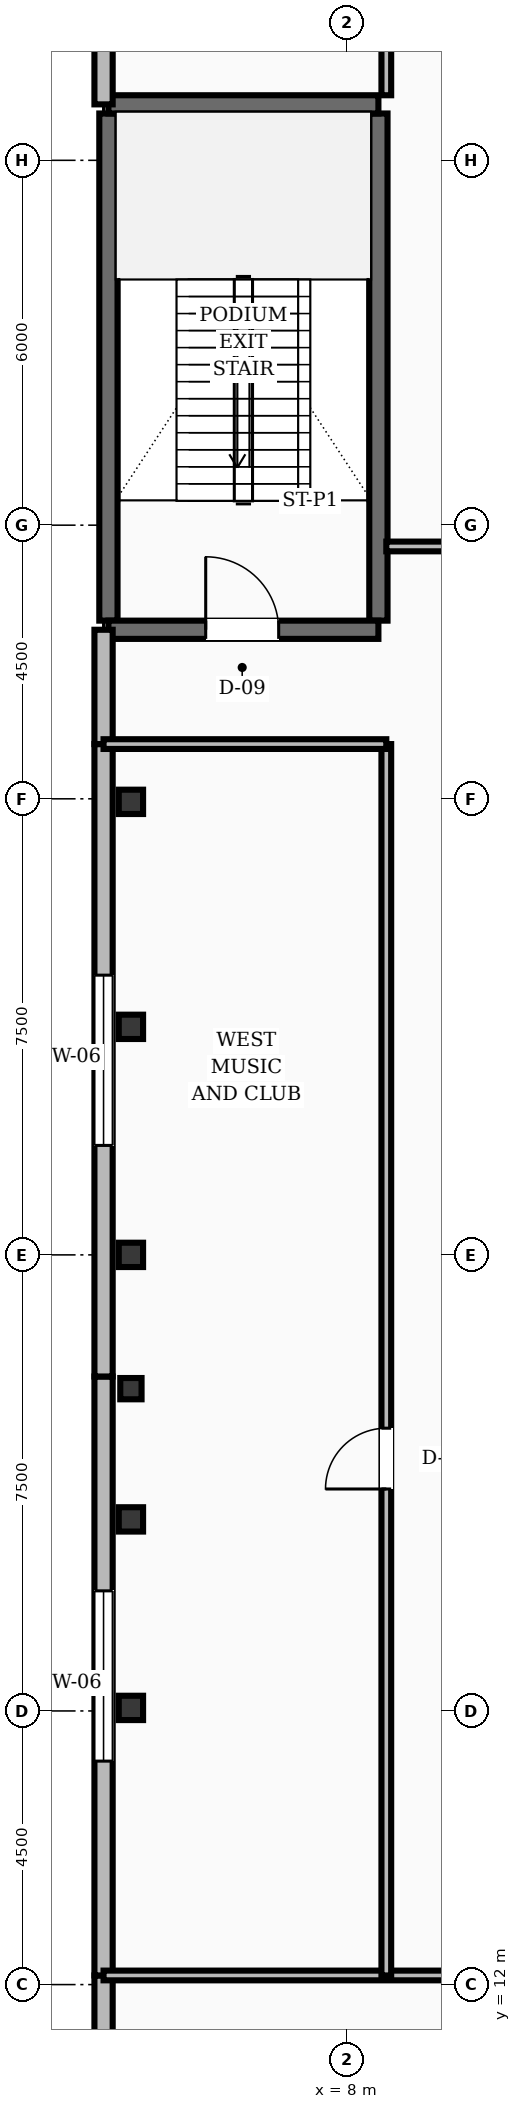
"""IFC4 building model, lengths in metres.
Left out: names, types, materials, properties, quantities, classifications, styles, units other than length and angle.
Written with IfcOpenShell. Run it as: python <this file> out.ifc"""

import sys

from ifc_helpers import new_model, si_unit, direction, frame, frame_2d, origin, origin_2d, place, context, subcontext, project, spatial, rectangle, hollow_rectangle, i_section, extrude, element, fill, save


model = new_model("IFC4")
c1 = context("Model", 3, precision=1e-05, world=origin(), true_north=direction((0.0, 1.0)))
c2 = subcontext(c1, "Body", "Model", "MODEL_VIEW")
j1 = project(units=[si_unit("LENGTHUNIT", "METRE"), si_unit("PLANEANGLEUNIT", "RADIAN")], contexts=[c1])
p1 = place(None, origin())
s1 = spatial("IfcSite", under=j1, at=p1, CompositionType="ELEMENT")
p2 = place(p1, origin())
s2 = spatial("IfcBuilding", under=s1, at=p2, CompositionType="ELEMENT")
p3 = place(p2, frame((0.0, 0.0, 5.2)))
s3 = spatial("IfcBuildingStorey", under=s2, at=p3, CompositionType="ELEMENT", Elevation=5.2)
for number, where, z_axis, x_axis in (
    (1, (4.08, 34.43, 0.0), (0.0, 0.0, 1.0), (0.0, 1.0, 0.0)),
    (2, (8.52, 34.43, 0.0), (0.0, 0.0, 1.0), (0.0, 1.0, 0.0)),
):
    element("IfcWall", number, at=place(p3, frame(where, z_axis=z_axis, x_axis=x_axis)), inside=s3, PredefinedType="SHEAR", context=c2, shape_type="SweptSolid", body=[
        extrude(rectangle(XDim=8.34, YDim=0.3, at=frame_2d((4.17, 0.0))), origin(), (0.0, 0.0, 1.0), 4.8),
    ])
p4 = place(p3, frame((4.08, 34.28, 0.0), z_axis=(0.0, 0.0, 1.0), x_axis=(1.0, 0.0, 0.0)))
e3 = element("IfcWall", 3, at=p4, inside=s3, PredefinedType="SHEAR", context=c2, shape_type="SweptSolid", body=[
    extrude(rectangle(XDim=4.44, YDim=0.3, at=frame_2d((2.22, 0.0))), origin(), (0.0, 0.0, 1.0), 4.8),
])
p5 = place(p4, frame((1.6, 0.0, 0.0)))
e4 = element("IfcOpeningElement", 4, at=p5, cuts=e3, PredefinedType="OPENING", context=c2, shape_type="SweptSolid", body=[
    extrude(rectangle(XDim=1.2, YDim=2.1, at=frame_2d((0.6, 1.05))), frame((0.0, 0.16, 0.0), z_axis=(0.0, -1.0, 0.0), x_axis=(1.0, 0.0, 0.0)), (0.0, 0.0, 1.0), 0.32),
])
p6 = place(p3, frame((4.08, 42.92, 0.0), z_axis=(0.0, 0.0, 1.0), x_axis=(1.0, 0.0, 0.0)))
e5 = element("IfcWall", 5, at=p6, inside=s3, PredefinedType="SHEAR", context=c2, shape_type="SweptSolid", body=[
    extrude(rectangle(XDim=4.44, YDim=0.3, at=frame_2d((2.22, 0.0))), origin(), (0.0, 0.0, 1.0), 4.8),
])
for number, where, z_axis, x_axis in (
    (6, (4.45, 16.55, 0.0), (0.0, 0.0, 1.0), (1.0, 0.0, 0.0)),
    (7, (4.45, 19.65, 0.0), (0.0, 0.0, 1.0), (1.0, 0.0, 0.0)),
    (8, (4.45, 24.0, 0.0), (0.0, 0.0, 1.0), (1.0, 0.0, 0.0)),
    (9, (4.45, 27.75, 0.0), (0.0, 0.0, 1.0), (1.0, 0.0, 0.0)),
    (10, (4.45, 31.45, 0.0), (0.0, 0.0, 1.0), (1.0, 0.0, 0.0)),
):
    element("IfcColumn", number, at=place(p3, frame(where, z_axis=z_axis, x_axis=x_axis)), inside=s3, PredefinedType="COLUMN", context=c2, shape_type="SweptSolid", body=[
        extrude(i_section(OverallWidth=0.4, OverallDepth=0.4, WebThickness=0.013, FlangeThickness=0.021, FilletRadius=0.018, at=origin_2d()), origin(), (0.0, 0.0, 1.0), 4.8),
    ])
p7 = place(p3, frame((4.45, 21.8, 0.0), z_axis=(0.0, 0.0, 1.0), x_axis=(1.0, 0.0, 0.0)))
e11 = element("IfcColumn", 11, at=p7, inside=s3, PredefinedType="PILASTER", context=c2, shape_type="SweptSolid", body=[
    extrude(hollow_rectangle(XDim=0.35, YDim=0.35, WallThickness=0.016, at=origin_2d()), origin(), (0.0, 0.0, 1.0), 4.8),
])
p8 = place(p3, frame((4.0, 12.15, 0.0), z_axis=(0.0, 0.0, 1.0), x_axis=(0.0, -1.0, 0.0)))
e12 = element("IfcWall", 12, at=p8, inside=s3, PredefinedType="STANDARD", context=c2, shape_type="SweptSolid", body=[
    extrude(rectangle(XDim=9.15, YDim=0.3, at=frame_2d((4.575, 0.0))), origin(), (0.0, 0.0, 1.0), 3.57),
])
p9 = place(p8, frame((3.175, 0.0, 0.85)))
e13 = element("IfcOpeningElement", 13, at=p9, cuts=e12, PredefinedType="OPENING", context=c2, shape_type="SweptSolid", body=[
    extrude(rectangle(XDim=2.8, YDim=2.3, at=frame_2d((1.4, 1.15))), frame((0.0, 0.16, 0.0), z_axis=(0.0, -1.0, 0.0), x_axis=(1.0, 0.0, 0.0)), (0.0, 0.0, 1.0), 0.32),
])
p10 = place(p3, frame((4.0, 22.0, 0.0), z_axis=(0.0, 0.0, 1.0), x_axis=(0.0, -1.0, 0.0)))
e14 = element("IfcWall", 14, at=p10, inside=s3, PredefinedType="STANDARD", context=c2, shape_type="SweptSolid", body=[
    extrude(rectangle(XDim=9.85, YDim=0.3, at=frame_2d((4.925, 0.0))), origin(), (0.0, 0.0, 1.0), 3.57),
])
p11 = place(p10, frame((3.525, 0.0, 0.85)))
e15 = element("IfcOpeningElement", 15, at=p11, cuts=e14, PredefinedType="OPENING", context=c2, shape_type="SweptSolid", body=[
    extrude(rectangle(XDim=2.8, YDim=2.3, at=frame_2d((1.4, 1.15))), frame((0.0, 0.16, 0.0), z_axis=(0.0, -1.0, 0.0), x_axis=(1.0, 0.0, 0.0)), (0.0, 0.0, 1.0), 0.32),
])
p12 = place(p3, frame((4.0, 32.4, 0.0), z_axis=(0.0, 0.0, 1.0), x_axis=(0.0, -1.0, 0.0)))
e16 = element("IfcWall", 16, at=p12, inside=s3, PredefinedType="STANDARD", context=c2, shape_type="SweptSolid", body=[
    extrude(rectangle(XDim=10.4, YDim=0.3, at=frame_2d((5.2, 0.0))), origin(), (0.0, 0.0, 1.0), 3.57),
])
p13 = place(p12, frame((3.8, 0.0, 0.85)))
e17 = element("IfcOpeningElement", 17, at=p13, cuts=e16, PredefinedType="OPENING", context=c2, shape_type="SweptSolid", body=[
    extrude(rectangle(XDim=2.8, YDim=2.3, at=frame_2d((1.4, 1.15))), frame((0.0, 0.16, 0.0), z_axis=(0.0, -1.0, 0.0), x_axis=(1.0, 0.0, 0.0)), (0.0, 0.0, 1.0), 0.32),
])
p14 = place(p3, frame((4.0, 34.28, 0.0), z_axis=(0.0, 0.0, 1.0), x_axis=(0.0, -1.0, 0.0)))
e18 = element("IfcWall", 18, at=p14, inside=s3, PredefinedType="STANDARD", context=c2, shape_type="SweptSolid", body=[
    extrude(rectangle(XDim=1.88, YDim=0.3, at=frame_2d((0.94, 0.0))), origin(), (0.0, 0.0, 1.0), 3.57),
])
p15 = place(p3, frame((4.0, 45.0, 0.0), z_axis=(0.0, 0.0, 1.0), x_axis=(0.0, -1.0, 0.0)))
e19 = element("IfcWall", 19, at=p15, inside=s3, PredefinedType="STANDARD", context=c2, shape_type="SweptSolid", body=[
    extrude(rectangle(XDim=2.08, YDim=0.3, at=frame_2d((1.04, 0.0))), origin(), (0.0, 0.0, 1.0), 3.57),
])
p16 = place(p3, frame((8.65, 35.65, 0.0), z_axis=(0.0, 0.0, 1.0), x_axis=(1.0, 0.0, 0.0)))
e20 = element("IfcWall", 20, at=p16, inside=s3, PredefinedType="SOLIDWALL", context=c2, shape_type="SweptSolid", body=[
    extrude(rectangle(XDim=46.7, YDim=0.16, at=frame_2d((23.35, 0.0))), origin(), (0.0, 0.0, 1.0), 3.52),
])
p17 = place(p16, frame((10.0, 0.0, 0.0)))
e21 = element("IfcOpeningElement", 21, at=p17, cuts=e20, PredefinedType="OPENING", context=c2, shape_type="SweptSolid", body=[
    extrude(rectangle(XDim=1.4, YDim=2.15, at=frame_2d((0.7, 1.075))), frame((0.0, 0.09, 0.0), z_axis=(0.0, -1.0, 0.0), x_axis=(1.0, 0.0, 0.0)), (0.0, 0.0, 1.0), 0.18),
])
p18 = place(p16, frame((28.0, 0.0, 0.0)))
e22 = element("IfcOpeningElement", 22, at=p18, cuts=e20, PredefinedType="OPENING", context=c2, shape_type="SweptSolid", body=[
    extrude(rectangle(XDim=1.2, YDim=2.1, at=frame_2d((0.6, 1.05))), frame((0.0, 0.09, 0.0), z_axis=(0.0, -1.0, 0.0), x_axis=(1.0, 0.0, 0.0)), (0.0, 0.0, 1.0), 0.18),
])
p19 = place(p16, frame((43.0, 0.0, 0.0)))
e23 = element("IfcOpeningElement", 23, at=p19, cuts=e20, PredefinedType="OPENING", context=c2, shape_type="SweptSolid", body=[
    extrude(rectangle(XDim=0.95, YDim=2.1, at=frame_2d((0.475, 1.05))), frame((0.0, 0.09, 0.0), z_axis=(0.0, -1.0, 0.0), x_axis=(1.0, 0.0, 0.0)), (0.0, 0.0, 1.0), 0.18),
])
p20 = place(p3, frame((4.0, 12.15, 0.0), z_axis=(0.0, 0.0, 1.0), x_axis=(1.0, 0.0, 0.0)))
e24 = element("IfcWall", 24, at=p20, inside=s3, PredefinedType="SOLIDWALL", context=c2, shape_type="SweptSolid", body=[
    extrude(rectangle(XDim=51.35, YDim=0.16, at=frame_2d((25.675, 0.0))), origin(), (0.0, 0.0, 1.0), 3.52),
])
p21 = place(p20, frame((14.0, 0.0, 0.0)))
e25 = element("IfcOpeningElement", 25, at=p21, cuts=e24, PredefinedType="OPENING", context=c2, shape_type="SweptSolid", body=[
    extrude(rectangle(XDim=1.4, YDim=2.15, at=frame_2d((0.7, 1.075))), frame((0.0, 0.09, 0.0), z_axis=(0.0, -1.0, 0.0), x_axis=(1.0, 0.0, 0.0)), (0.0, 0.0, 1.0), 0.18),
])
p22 = place(p20, frame((40.0, 0.0, 0.0)))
e26 = element("IfcOpeningElement", 26, at=p22, cuts=e24, PredefinedType="OPENING", context=c2, shape_type="SweptSolid", body=[
    extrude(rectangle(XDim=1.2, YDim=2.1, at=frame_2d((0.6, 1.05))), frame((0.0, 0.09, 0.0), z_axis=(0.0, -1.0, 0.0), x_axis=(1.0, 0.0, 0.0)), (0.0, 0.0, 1.0), 0.18),
])
p23 = place(p3, frame((8.65, 12.15, 0.0), z_axis=(0.0, 0.0, 1.0), x_axis=(0.0, 1.0, 0.0)))
e27 = element("IfcWall", 27, at=p23, inside=s3, PredefinedType="SOLIDWALL", context=c2, shape_type="SweptSolid", body=[
    extrude(rectangle(XDim=20.25, YDim=0.16, at=frame_2d((10.125, 0.0))), origin(), (0.0, 0.0, 1.0), 3.52),
])
p24 = place(p23, frame((8.0, 0.0, 0.0)))
e28 = element("IfcOpeningElement", 28, at=p24, cuts=e27, PredefinedType="OPENING", context=c2, shape_type="SweptSolid", body=[
    extrude(rectangle(XDim=1.0, YDim=2.1, at=frame_2d((0.5, 1.05))), frame((0.0, 0.09, 0.0), z_axis=(0.0, -1.0, 0.0), x_axis=(1.0, 0.0, 0.0)), (0.0, 0.0, 1.0), 0.18),
])
p25 = place(p3, frame((4.0, 32.4, 0.0), z_axis=(0.0, 0.0, 1.0), x_axis=(1.0, 0.0, 0.0)))
e29 = element("IfcWall", 29, at=p25, inside=s3, PredefinedType="SOLIDWALL", context=c2, shape_type="SweptSolid", body=[
    extrude(rectangle(XDim=4.65, YDim=0.16, at=frame_2d((2.325, 0.0))), origin(), (0.0, 0.0, 1.0), 3.52),
])
p26 = place(p3, frame((8.65, 43.07, 0.0), z_axis=(0.0, 0.0, 1.0), x_axis=(0.0, 1.0, 0.0)))
e30 = element("IfcWall", 30, at=p26, inside=s3, PredefinedType="SOLIDWALL", context=c2, shape_type="SweptSolid", body=[
    extrude(rectangle(XDim=1.93, YDim=0.16, at=frame_2d((0.965, 0.0))), origin(), (0.0, 0.0, 1.0), 3.52),
])
p27 = place(p11, origin())
e31 = element("IfcWindow", 31, at=p27, inside=s3, PartitioningType="SINGLE_PANEL", PredefinedType="WINDOW", context=c2, shape_type="SweptSolid", body=[
    extrude(rectangle(XDim=2.8, YDim=2.3, at=frame_2d((1.4, 1.15))), frame((0.0, 0.03, 0.0), z_axis=(0.0, -1.0, 0.0), x_axis=(1.0, 0.0, 0.0)), (0.0, 0.0, 1.0), 0.06),
])
fill(e15, e31)
p28 = place(p13, origin())
e32 = element("IfcWindow", 32, at=p28, inside=s3, PartitioningType="SINGLE_PANEL", PredefinedType="WINDOW", context=c2, shape_type="SweptSolid", body=[
    extrude(rectangle(XDim=2.8, YDim=2.3, at=frame_2d((1.4, 1.15))), frame((0.0, 0.03, 0.0), z_axis=(0.0, -1.0, 0.0), x_axis=(1.0, 0.0, 0.0)), (0.0, 0.0, 1.0), 0.06),
])
fill(e17, e32)
p29 = place(p5, origin())
e33 = element("IfcDoor", 33, at=p29, inside=s3, OperationType="SINGLE_SWING_LEFT", PredefinedType="DOOR", context=c2, shape_type="SweptSolid", body=[
    extrude(rectangle(XDim=1.2, YDim=2.1, at=frame_2d((0.6, 1.05))), frame((0.0, 0.025, 0.0), z_axis=(0.0, -1.0, 0.0), x_axis=(1.0, 0.0, 0.0)), (0.0, 0.0, 1.0), 0.05),
])
fill(e4, e33)
p30 = place(p24, origin())
e34 = element("IfcDoor", 34, at=p30, inside=s3, OperationType="SINGLE_SWING_LEFT", PredefinedType="DOOR", context=c2, shape_type="SweptSolid", body=[
    extrude(rectangle(XDim=1.0, YDim=2.1, at=frame_2d((0.5, 1.05))), frame((0.0, 0.025, 0.0), z_axis=(0.0, -1.0, 0.0), x_axis=(1.0, 0.0, 0.0)), (0.0, 0.0, 1.0), 0.05),
])
fill(e28, e34)
save(model, sys.argv[1])
